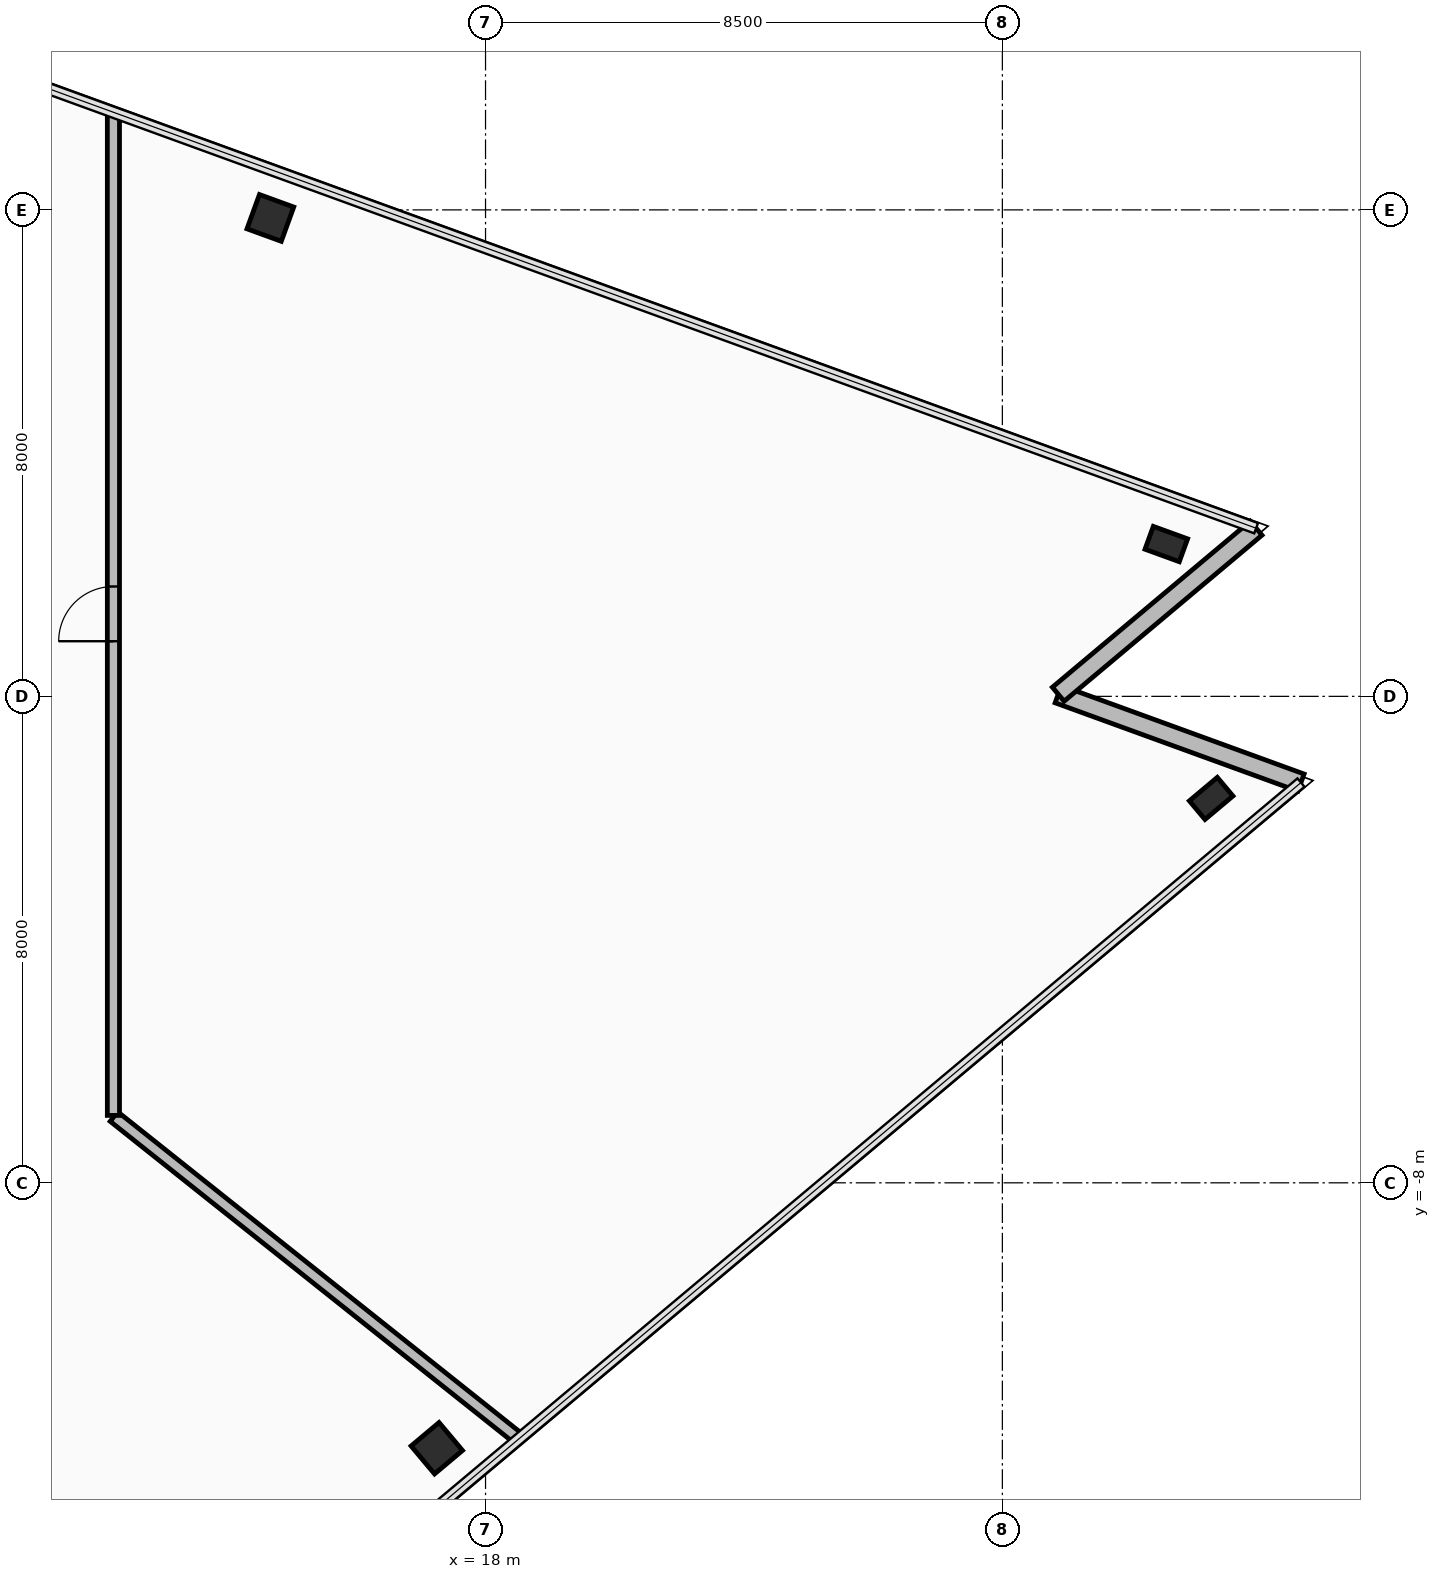
"""IFC4 building model, lengths in metres.
Left out: names, types, materials, properties, quantities, classifications, styles, units other than length and angle.
Written with IfcOpenShell. Run it as: python <this file> out.ifc"""

import sys

from ifc_helpers import new_model, si_unit, direction, frame, frame_2d, origin, origin_2d, place, context, subcontext, project, spatial, rectangle, hollow_rectangle, extrude, element, fill, save


model = new_model("IFC4")
c1 = context("Model", 3, precision=1e-05, world=origin(), true_north=direction((0.0, 1.0)))
c2 = subcontext(c1, "Body", "Model", "MODEL_VIEW")
j1 = project(units=[si_unit("LENGTHUNIT", "METRE"), si_unit("PLANEANGLEUNIT", "RADIAN")], contexts=[c1])
p1 = place(None, origin())
s1 = spatial("IfcSite", under=j1, at=p1, CompositionType="ELEMENT")
p2 = place(p1, origin())
s2 = spatial("IfcBuilding", under=s1, at=p2, CompositionType="ELEMENT")
p3 = place(p2, frame((0.0, 0.0, 192.1)))
s3 = spatial("IfcBuildingStorey", under=s2, at=p3, CompositionType="ELEMENT", Elevation=192.1)
p4 = place(p3, frame((17.198, -12.365, 0.0), z_axis=(0.0, 0.0, 1.0), x_axis=(0.766043321242, 0.642788946685, 0.0)))
e1 = element("IfcColumn", 1, at=p4, inside=s3, PredefinedType="COLUMN", context=c2, shape_type="SweptSolid", body=[
    extrude(hollow_rectangle(XDim=0.6, YDim=0.6, WallThickness=0.036, at=origin_2d()), origin(), (0.0, 0.0, 1.0), 4.75),
])
for number, where, z_axis, x_axis in (
    (2, (29.934, -1.679, 0.0), (0.0, 0.0, 1.0), (0.766, 0.643, 0.0)),
    (3, (29.196, 2.505, 0.0), (0.0, 0.0, 1.0), (-0.94, 0.342, 0.0)),
):
    element("IfcColumn", number, at=place(p3, frame(where, z_axis=z_axis, x_axis=x_axis)), inside=s3, PredefinedType="COLUMN", context=c2, shape_type="SweptSolid", body=[
        extrude(hollow_rectangle(XDim=0.4, YDim=0.6, WallThickness=0.03, at=origin_2d()), origin(), (0.0, 0.0, 1.0), 4.75),
    ])
p5 = place(p3, frame((14.461, 7.868, 0.0), z_axis=(0.0, 0.0, 1.0), x_axis=(-0.939692023847, 0.342021783398, 0.0)))
e4 = element("IfcColumn", 4, at=p5, inside=s3, PredefinedType="COLUMN", context=c2, shape_type="SweptSolid", body=[
    extrude(hollow_rectangle(XDim=0.6, YDim=0.6, WallThickness=0.036, at=origin_2d()), origin(), (0.0, 0.0, 1.0), 4.75),
])
for number, where, z_axis, x_axis in (
    (5, (31.411, -1.418, 0.0), (0.0, 0.0, 1.0), (-0.94, 0.342, 0.0)),
    (6, (27.419, 0.035, 0.0), (0.0, 0.0, 1.0), (0.766, 0.643, 0.0)),
):
    element("IfcWall", number, at=place(p3, frame(where, z_axis=z_axis, x_axis=x_axis)), inside=s3, PredefinedType="STANDARD", context=c2, shape_type="SweptSolid", body=[
        extrude(rectangle(XDim=4.248, YDim=0.3, at=frame_2d((2.124, 0.0))), origin(), (0.0, 0.0, 1.0), 2.255),
    ])
p6 = place(p3, frame((6.618, -10.592, 0.0), z_axis=(0.0, 0.0, 1.0), x_axis=(0.52993291872, -0.848039563733, 0.0)))
e7 = element("IfcWall", 7, at=p6, inside=s3, PredefinedType="PARTITIONING", context=c2, shape_type="SweptSolid", body=[
    extrude(rectangle(XDim=8.975, YDim=0.2, at=frame_2d((4.487, 0.0))), origin(), (0.0, 0.0, 1.0), 2.255),
])
p7 = place(p3, frame((18.548, -12.211, 0.0), z_axis=(0.0, 0.0, 1.0), x_axis=(-0.782380574332, 0.622800639778, 0.0)))
e8 = element("IfcWall", 8, at=p7, inside=s3, PredefinedType="PARTITIONING", context=c2, shape_type="SweptSolid", body=[
    extrude(rectangle(XDim=8.511, YDim=0.2, at=frame_2d((4.255, 0.0))), origin(), (0.0, 0.0, 1.0), 2.255),
])
p8 = place(p3, frame((11.88, -6.891, 0.0), z_axis=(0.0, 0.0, 1.0), x_axis=(0.0, 1.0, 0.0)))
e9 = element("IfcWall", 9, at=p8, inside=s3, PredefinedType="PARTITIONING", context=c2, shape_type="SweptSolid", body=[
    extrude(rectangle(XDim=16.497, YDim=0.2, at=frame_2d((8.249, 0.0))), origin(), (0.0, 0.0, 1.0), 2.255),
])
p9 = place(p8, frame((7.798, 0.0, 0.0)))
e10 = element("IfcOpeningElement", 10, at=p9, cuts=e9, PredefinedType="OPENING", context=c2, shape_type="SweptSolid", body=[
    extrude(rectangle(XDim=0.9, YDim=2.1, at=frame_2d((0.45, 1.05))), frame((0.0, 0.11, 0.0), z_axis=(0.0, -1.0, 0.0), x_axis=(1.0, 0.0, 0.0)), (0.0, 0.0, 1.0), 0.22),
])
p10 = place(p9, origin())
e11 = element("IfcDoor", 11, at=p10, inside=s3, OperationType="SINGLE_SWING_LEFT", PredefinedType="DOOR", context=c2, shape_type="SweptSolid", body=[
    extrude(rectangle(XDim=0.9, YDim=2.1, at=frame_2d((0.45, 1.05))), frame((0.0, 0.025, 0.0), z_axis=(0.0, -1.0, 0.0), x_axis=(1.0, 0.0, 0.0)), (0.0, 0.0, 1.0), 0.05),
])
fill(e10, e11)
save(model, sys.argv[1])
